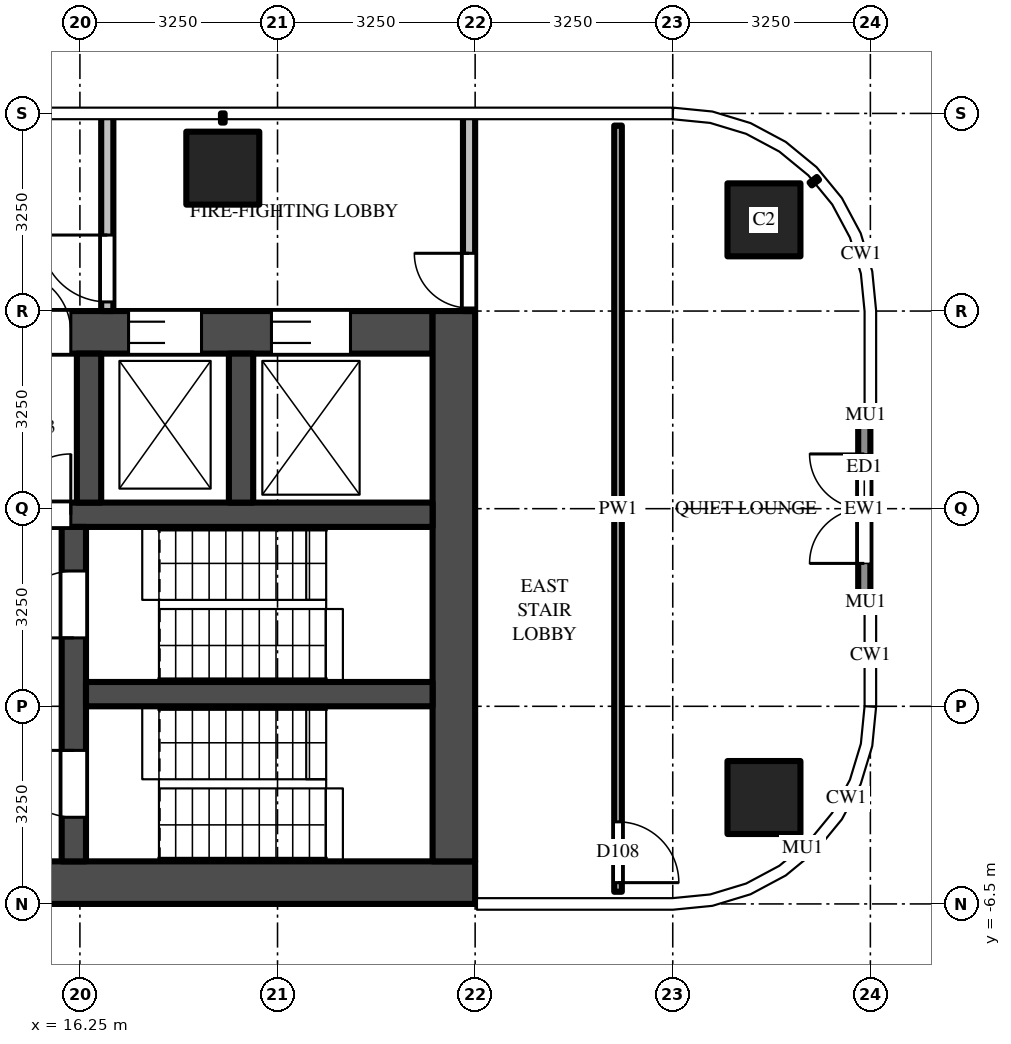
"""IFC4 building model, lengths in metres.
Left out: names, types, materials, properties, quantities, classifications, styles, units other than length and angle.
Written with IfcOpenShell. Run it as: python <this file> out.ifc"""

import sys

from ifc_helpers import new_model, si_unit, direction, frame, frame_2d, origin, origin_2d, place, context, subcontext, project, spatial, rectangle, extrude, source, transform, mapped, element, fill, save


model = new_model("IFC4")
c1 = context("Model", 3, precision=1e-05, world=origin(), true_north=direction((0.0, 1.0)))
c2 = subcontext(c1, "Body", "Model", "MODEL_VIEW")
j1 = project(units=[si_unit("LENGTHUNIT", "METRE"), si_unit("PLANEANGLEUNIT", "RADIAN")], contexts=[c1])
p1 = place(None, origin())
s1 = spatial("IfcSite", under=j1, at=p1, CompositionType="ELEMENT")
p2 = place(p1, origin())
s2 = spatial("IfcBuilding", under=s1, at=p2, CompositionType="ELEMENT")
p3 = place(p2, frame((0.0, 0.0, 181.5)))
s3 = spatial("IfcBuildingStorey", under=s2, at=p3, CompositionType="ELEMENT", Elevation=181.5)
m1 = source(origin(), c2, "Body", "SweptSolid", [
    extrude(rectangle(XDim=1.2, YDim=1.2, at=origin_2d()), origin(), (0.0, 0.0, 1.0), 3.9),
])
for number, where, z_axis, x_axis in (
    (1, (18.6, 5.6, 0.0), (0.0, 0.0, 1.0), (1.0, 0.0, 0.0)),
    (2, (27.5, 4.75, 0.0), (0.0, 0.0, 1.0), (1.0, 0.0, 0.0)),
    (3, (27.5, -4.75, 0.0), (0.0, 0.0, 1.0), (1.0, 0.0, 0.0)),
):
    element("IfcColumn", number, at=place(p3, frame(where, z_axis=z_axis, x_axis=x_axis)), inside=s3, PredefinedType="COLUMN", context=c2, shape_type="MappedRepresentation", body=[
        mapped(m1, transform((0.0, 0.0, 0.0))),
    ])
m2 = source(origin(), c2, "Body", "SweptSolid", [
    extrude(rectangle(XDim=16.55, YDim=0.7, at=frame_2d((8.275, 0.0))), origin(), (0.0, 0.0, 1.0), 3.7),
])
p4 = place(p3, frame((6.2, -6.15, 0.0), z_axis=(0.0, 0.0, 1.0), x_axis=(1.0, 0.0, 0.0)))
e4 = element("IfcWall", 4, at=p4, inside=s3, PredefinedType="SHEAR", context=c2, shape_type="MappedRepresentation", body=[
    mapped(m2, transform((0.0, 0.0, 0.0))),
])
m3 = source(origin(), c2, "Body", "SweptSolid", [
    extrude(rectangle(XDim=14.85, YDim=0.7, at=frame_2d((7.425, 0.0))), origin(), (0.0, 0.0, 1.0), 3.7),
])
p5 = place(p3, frame((7.2, 2.9, 0.0), z_axis=(0.0, 0.0, 1.0), x_axis=(1.0, 0.0, 0.0)))
e5 = element("IfcWall", 5, at=p5, inside=s3, PredefinedType="SHEAR", context=c2, shape_type="MappedRepresentation", body=[
    mapped(m3, transform((0.0, 0.0, 0.0))),
])
m4 = source(origin(), c2, "Body", "SweptSolid", [
    extrude(rectangle(XDim=1.1, YDim=2.1, at=frame_2d((0.55, 1.05))), frame((0.0, 0.36, 0.0), z_axis=(0.0, -1.0, 0.0), x_axis=(1.0, 0.0, 0.0)), (0.0, 0.0, 1.0), 0.72),
])
p6 = place(p5, frame((0.55, 0.0, 0.0)))
e6 = element("IfcOpeningElement", 6, at=p6, cuts=e5, PredefinedType="OPENING", context=c2, shape_type="MappedRepresentation", body=[
    mapped(m4, transform((0.0, 0.0, 0.0))),
])
p7 = place(p5, frame((3.15, 0.0, 0.0)))
e7 = element("IfcOpeningElement", 7, at=p7, cuts=e5, PredefinedType="OPENING", context=c2, shape_type="MappedRepresentation", body=[
    mapped(m4, transform((0.0, 0.0, 0.0))),
])
m5 = source(origin(), c2, "Body", "SweptSolid", [
    extrude(rectangle(XDim=1.2, YDim=2.1, at=frame_2d((0.6, 1.05))), frame((0.0, 0.36, 0.0), z_axis=(0.0, -1.0, 0.0), x_axis=(1.0, 0.0, 0.0)), (0.0, 0.0, 1.0), 0.72),
])
p8 = place(p5, frame((5.7, 0.0, 0.0)))
e8 = element("IfcOpeningElement", 8, at=p8, cuts=e5, PredefinedType="OPENING", context=c2, shape_type="MappedRepresentation", body=[
    mapped(m5, transform((0.0, 0.0, 0.0))),
])
m6 = source(origin(), c2, "Body", "SweptSolid", [
    extrude(rectangle(XDim=1.3, YDim=2.1, at=frame_2d((0.65, 1.05))), frame((0.0, 0.36, 0.0), z_axis=(0.0, -1.0, 0.0), x_axis=(1.0, 0.0, 0.0)), (0.0, 0.0, 1.0), 0.72),
])
p9 = place(p5, frame((12.2, 0.0, 0.0)))
e9 = element("IfcOpeningElement", 9, at=p9, cuts=e5, PredefinedType="OPENING", context=c2, shape_type="MappedRepresentation", body=[
    mapped(m6, transform((0.0, 0.0, 0.0))),
])
p10 = place(p5, frame((9.85, 0.0, 0.0)))
e10 = element("IfcOpeningElement", 10, at=p10, cuts=e5, PredefinedType="OPENING", context=c2, shape_type="MappedRepresentation", body=[
    mapped(m5, transform((0.0, 0.0, 0.0))),
])
m7 = source(origin(), c2, "Body", "SweptSolid", [
    extrude(rectangle(XDim=1.0, YDim=2.1, at=frame_2d((0.5, 1.05))), frame((0.0, 0.36, 0.0), z_axis=(0.0, -1.0, 0.0), x_axis=(1.0, 0.0, 0.0)), (0.0, 0.0, 1.0), 0.72),
])
p11 = place(p5, frame((7.9, 0.0, 0.0)))
e11 = element("IfcOpeningElement", 11, at=p11, cuts=e5, PredefinedType="OPENING", context=c2, shape_type="MappedRepresentation", body=[
    mapped(m7, transform((0.0, 0.0, 0.0))),
])
m8 = source(origin(), c2, "Body", "SweptSolid", [
    extrude(rectangle(XDim=9.05, YDim=0.7, at=frame_2d((4.525, 0.0))), origin(), (0.0, 0.0, 1.0), 3.7),
])
p12 = place(p3, frame((22.4, -5.8, 0.0), z_axis=(0.0, 0.0, 1.0), x_axis=(0.0, 1.0, 0.0)))
e12 = element("IfcWall", 12, at=p12, inside=s3, PredefinedType="SHEAR", context=c2, shape_type="MappedRepresentation", body=[
    mapped(m8, transform((0.0, 0.0, 0.0))),
])
m9 = source(origin(), c2, "Body", "SweptSolid", [
    extrude(rectangle(XDim=14.85, YDim=0.4, at=frame_2d((7.425, 0.0))), origin(), (0.0, 0.0, 1.0), 3.7),
])
p13 = place(p3, frame((7.2, -0.1, 0.0), z_axis=(0.0, 0.0, 1.0), x_axis=(1.0, 0.0, 0.0)))
e13 = element("IfcWall", 13, at=p13, inside=s3, PredefinedType="SHEAR", context=c2, shape_type="MappedRepresentation", body=[
    mapped(m9, transform((0.0, 0.0, 0.0))),
])
m10 = source(origin(), c2, "Body", "SweptSolid", [
    extrude(rectangle(XDim=1.0, YDim=2.1, at=frame_2d((0.5, 1.05))), frame((0.0, 0.21, 0.0), z_axis=(0.0, -1.0, 0.0), x_axis=(1.0, 0.0, 0.0)), (0.0, 0.0, 1.0), 0.42),
])
p14 = place(p13, frame((7.9, 0.0, 0.0)))
e14 = element("IfcOpeningElement", 14, at=p14, cuts=e13, PredefinedType="OPENING", context=c2, shape_type="MappedRepresentation", body=[
    mapped(m10, transform((0.0, 0.0, 0.0))),
])
m11 = source(origin(), c2, "Body", "SweptSolid", [
    extrude(rectangle(XDim=5.5, YDim=0.4, at=frame_2d((2.75, 0.0))), origin(), (0.0, 0.0, 1.0), 3.7),
])
p15 = place(p3, frame((16.15, -5.8, 0.0), z_axis=(0.0, 0.0, 1.0), x_axis=(0.0, 1.0, 0.0)))
e15 = element("IfcWall", 15, at=p15, inside=s3, PredefinedType="SHEAR", context=c2, shape_type="MappedRepresentation", body=[
    mapped(m11, transform((0.0, 0.0, 0.0))),
])
m12 = source(origin(), c2, "Body", "SweptSolid", [
    extrude(rectangle(XDim=1.1, YDim=2.1, at=frame_2d((0.55, 1.05))), frame((0.0, 0.21, 0.0), z_axis=(0.0, -1.0, 0.0), x_axis=(1.0, 0.0, 0.0)), (0.0, 0.0, 1.0), 0.42),
])
p16 = place(p15, frame((0.725, 0.0, 0.0)))
e16 = element("IfcOpeningElement", 16, at=p16, cuts=e15, PredefinedType="OPENING", context=c2, shape_type="MappedRepresentation", body=[
    mapped(m12, transform((0.0, 0.0, 0.0))),
])
p17 = place(p15, frame((3.675, 0.0, 0.0)))
e17 = element("IfcOpeningElement", 17, at=p17, cuts=e15, PredefinedType="OPENING", context=c2, shape_type="MappedRepresentation", body=[
    mapped(m12, transform((0.0, 0.0, 0.0))),
])
m13 = source(origin(), c2, "Body", "SweptSolid", [
    extrude(rectangle(XDim=5.7, YDim=0.4, at=frame_2d((2.85, 0.0))), origin(), (0.0, 0.0, 1.0), 3.7),
])
p18 = place(p3, frame((16.35, -3.05, 0.0), z_axis=(0.0, 0.0, 1.0), x_axis=(1.0, 0.0, 0.0)))
e18 = element("IfcWall", 18, at=p18, inside=s3, PredefinedType="SHEAR", context=c2, shape_type="MappedRepresentation", body=[
    mapped(m13, transform((0.0, 0.0, 0.0))),
])
m14 = source(origin(), c2, "Body", "SweptSolid", [
    extrude(rectangle(XDim=2.45, YDim=0.4, at=frame_2d((1.225, 0.0))), origin(), (0.0, 0.0, 1.0), 3.7),
])
for number, where, z_axis, x_axis in (
    (19, (16.4, 0.1, 0.0), (0.0, 0.0, 1.0), (0.0, 1.0, 0.0)),
    (20, (18.9, 0.1, 0.0), (0.0, 0.0, 1.0), (0.0, 1.0, 0.0)),
):
    element("IfcWall", number, at=place(p3, frame(where, z_axis=z_axis, x_axis=x_axis)), inside=s3, PredefinedType="SHEAR", context=c2, shape_type="MappedRepresentation", body=[
        mapped(m14, transform((0.0, 0.0, 0.0))),
    ])
m15 = source(origin(), c2, "Body", "SweptSolid", [
    extrude(rectangle(XDim=3.25, YDim=0.2, at=frame_2d((1.625, 0.0))), origin(), (0.0, 0.0, 1.0), 3.7),
])
p19 = place(p3, frame((16.7, 3.25, 0.0), z_axis=(0.0, 0.0, 1.0), x_axis=(0.0, 1.0, 0.0)))
e21 = element("IfcWall", 21, at=p19, inside=s3, PredefinedType="PARTITIONING", context=c2, shape_type="MappedRepresentation", body=[
    mapped(m15, transform((0.0, 0.0, 0.0))),
])
m16 = source(origin(), c2, "Body", "SweptSolid", [
    extrude(rectangle(XDim=1.1, YDim=2.1, at=frame_2d((0.55, 1.05))), frame((0.0, 0.11, 0.0), z_axis=(0.0, -1.0, 0.0), x_axis=(1.0, 0.0, 0.0)), (0.0, 0.0, 1.0), 0.22),
])
p20 = place(p19, frame((0.15, 0.0, 0.0)))
e22 = element("IfcOpeningElement", 22, at=p20, cuts=e21, PredefinedType="OPENING", context=c2, shape_type="MappedRepresentation", body=[
    mapped(m16, transform((0.0, 0.0, 0.0))),
])
p21 = place(p3, frame((22.65, 3.25, 0.0), z_axis=(0.0, 0.0, 1.0), x_axis=(0.0, 1.0, 0.0)))
e23 = element("IfcWall", 23, at=p21, inside=s3, PredefinedType="PARTITIONING", context=c2, shape_type="MappedRepresentation", body=[
    mapped(m15, transform((0.0, 0.0, 0.0))),
])
m17 = source(origin(), c2, "Body", "SweptSolid", [
    extrude(rectangle(XDim=0.9, YDim=2.1, at=frame_2d((0.45, 1.05))), frame((0.0, 0.11, 0.0), z_axis=(0.0, -1.0, 0.0), x_axis=(1.0, 0.0, 0.0)), (0.0, 0.0, 1.0), 0.22),
])
p22 = place(p21, frame((0.05, 0.0, 0.0)))
e24 = element("IfcOpeningElement", 24, at=p22, cuts=e23, PredefinedType="OPENING", context=c2, shape_type="MappedRepresentation", body=[
    mapped(m17, transform((0.0, 0.0, 0.0))),
])
m18 = source(origin(), c2, "Body", "SweptSolid", [
    extrude(rectangle(XDim=3.0, YDim=0.2, at=frame_2d((1.5, 0.0))), origin(), (0.0, 0.0, 1.0), 3.7),
])
p23 = place(p3, frame((29.15, -1.5, 0.0), z_axis=(0.0, 0.0, 1.0), x_axis=(0.0, 1.0, 0.0)))
e25 = element("IfcWall", 25, at=p23, inside=s3, PredefinedType="SOLIDWALL", context=c2, shape_type="MappedRepresentation", body=[
    mapped(m18, transform((0.0, 0.0, 0.0))),
])
m19 = source(origin(), c2, "Body", "SweptSolid", [
    extrude(rectangle(XDim=1.8, YDim=2.4, at=frame_2d((0.9, 1.2))), frame((0.0, 0.11, 0.0), z_axis=(0.0, -1.0, 0.0), x_axis=(1.0, 0.0, 0.0)), (0.0, 0.0, 1.0), 0.22),
])
p24 = place(p23, frame((0.6, 0.0, 0.0)))
e26 = element("IfcOpeningElement", 26, at=p24, cuts=e25, PredefinedType="OPENING", context=c2, shape_type="MappedRepresentation", body=[
    mapped(m19, transform((0.0, 0.0, 0.0))),
])
m20 = source(origin(), c2, "Body", "SweptSolid", [
    extrude(rectangle(XDim=12.6, YDim=0.125, at=frame_2d((6.3, 0.0))), origin(), (0.0, 0.0, 1.0), 2.78),
])
p25 = place(p3, frame((25.1, 6.3, 0.0), z_axis=(0.0, 0.0, 1.0), x_axis=(0.0, -1.0, 0.0)))
e27 = element("IfcWall", 27, at=p25, inside=s3, PredefinedType="PARTITIONING", context=c2, shape_type="MappedRepresentation", body=[
    mapped(m20, transform((0.0, 0.0, 0.0))),
])
m21 = source(origin(), c2, "Body", "SweptSolid", [
    extrude(rectangle(XDim=1.0, YDim=2.1, at=frame_2d((0.5, 1.05))), frame((0.0, 0.073, 0.0), z_axis=(0.0, -1.0, 0.0), x_axis=(1.0, 0.0, 0.0)), (0.0, 0.0, 1.0), 0.145),
])
p26 = place(p25, frame((11.45, 0.0, 0.0)))
e28 = element("IfcOpeningElement", 28, at=p26, cuts=e27, PredefinedType="OPENING", context=c2, shape_type="MappedRepresentation", body=[
    mapped(m21, transform((0.0, 0.0, 0.0))),
])
m22 = source(origin(), c2, "Body", "SweptSolid", [
    extrude(rectangle(XDim=1.3, YDim=2.1, at=frame_2d((0.65, 1.05))), frame((0.0, -0.275, 0.0), z_axis=(0.0, -1.0, 0.0), x_axis=(1.0, 0.0, 0.0)), (0.0, 0.0, 1.0), 0.05),
])
p27 = place(p9, origin())
e29 = element("IfcDoor", 29, at=p27, inside=s3, OperationType="DOUBLE_DOOR_SLIDING", PredefinedType="DOOR", context=c2, shape_type="MappedRepresentation", body=[
    mapped(m22, transform((0.0, 0.0, 0.0))),
])
fill(e9, e29)
m23 = source(origin(), c2, "Body", "SweptSolid", [
    extrude(rectangle(XDim=1.2, YDim=2.1, at=frame_2d((0.6, 1.05))), frame((0.0, -0.275, 0.0), z_axis=(0.0, -1.0, 0.0), x_axis=(1.0, 0.0, 0.0)), (0.0, 0.0, 1.0), 0.05),
])
p28 = place(p10, origin())
e30 = element("IfcDoor", 30, at=p28, inside=s3, OperationType="DOUBLE_DOOR_SLIDING", PredefinedType="DOOR", context=c2, shape_type="MappedRepresentation", body=[
    mapped(m23, transform((0.0, 0.0, 0.0))),
])
fill(e10, e30)
m24 = source(origin(), c2, "Body", "SweptSolid", [
    extrude(rectangle(XDim=1.1, YDim=2.1, at=frame_2d((0.55, 1.05))), frame((0.0, 0.025, 0.0), z_axis=(0.0, -1.0, 0.0), x_axis=(1.0, 0.0, 0.0)), (0.0, 0.0, 1.0), 0.05),
])
p29 = place(p16, origin())
e31 = element("IfcDoor", 31, at=p29, inside=s3, OperationType="SINGLE_SWING_RIGHT", PredefinedType="DOOR", context=c2, shape_type="MappedRepresentation", body=[
    mapped(m24, transform((0.0, 0.0, 0.0))),
])
fill(e16, e31)
p30 = place(p17, origin())
e32 = element("IfcDoor", 32, at=p30, inside=s3, OperationType="SINGLE_SWING_LEFT", PredefinedType="DOOR", context=c2, shape_type="MappedRepresentation", body=[
    mapped(m24, transform((0.0, 0.0, 0.0))),
])
fill(e17, e32)
m25 = source(origin(), c2, "Body", "SweptSolid", [
    extrude(rectangle(XDim=1.0, YDim=2.1, at=frame_2d((0.5, 1.05))), frame((0.0, 0.025, 0.0), z_axis=(0.0, -1.0, 0.0), x_axis=(1.0, 0.0, 0.0)), (0.0, 0.0, 1.0), 0.05),
])
p31 = place(p14, origin())
e33 = element("IfcDoor", 33, at=p31, inside=s3, OperationType="SINGLE_SWING_RIGHT", PredefinedType="DOOR", context=c2, shape_type="MappedRepresentation", body=[
    mapped(m25, transform((0.0, 0.0, 0.0))),
])
fill(e14, e33)
m26 = source(origin(), c2, "Body", "SweptSolid", [
    extrude(rectangle(XDim=1.0, YDim=2.1, at=frame_2d((0.5, 1.05))), frame((0.0, -0.275, 0.0), z_axis=(0.0, -1.0, 0.0), x_axis=(1.0, 0.0, 0.0)), (0.0, 0.0, 1.0), 0.05),
])
p32 = place(p11, origin())
e34 = element("IfcDoor", 34, at=p32, inside=s3, OperationType="SINGLE_SWING_LEFT", PredefinedType="DOOR", context=c2, shape_type="MappedRepresentation", body=[
    mapped(m26, transform((0.0, 0.0, 0.0))),
])
fill(e11, e34)
p33 = place(p20, origin())
e35 = element("IfcDoor", 35, at=p33, inside=s3, OperationType="SINGLE_SWING_RIGHT", PredefinedType="DOOR", context=c2, shape_type="MappedRepresentation", body=[
    mapped(m24, transform((0.0, 0.0, 0.0))),
])
fill(e22, e35)
m27 = source(origin(), c2, "Body", "SweptSolid", [
    extrude(rectangle(XDim=0.9, YDim=2.1, at=frame_2d((0.45, 1.05))), frame((0.0, 0.025, 0.0), z_axis=(0.0, -1.0, 0.0), x_axis=(1.0, 0.0, 0.0)), (0.0, 0.0, 1.0), 0.05),
])
p34 = place(p22, origin())
e36 = element("IfcDoor", 36, at=p34, inside=s3, OperationType="SINGLE_SWING_RIGHT", PredefinedType="DOOR", context=c2, shape_type="MappedRepresentation", body=[
    mapped(m27, transform((0.0, 0.0, 0.0))),
])
fill(e24, e36)
m28 = source(origin(), c2, "Body", "SweptSolid", [
    extrude(rectangle(XDim=1.8, YDim=2.4, at=frame_2d((0.9, 1.2))), frame((0.0, 0.025, 0.0), z_axis=(0.0, -1.0, 0.0), x_axis=(1.0, 0.0, 0.0)), (0.0, 0.0, 1.0), 0.05),
])
p35 = place(p24, origin())
e37 = element("IfcDoor", 37, at=p35, inside=s3, OperationType="DOUBLE_DOOR_SINGLE_SWING", PredefinedType="DOOR", context=c2, shape_type="MappedRepresentation", body=[
    mapped(m28, transform((0.0, 0.0, 0.0))),
])
fill(e26, e37)
p36 = place(p26, origin())
e38 = element("IfcDoor", 38, at=p36, inside=s3, OperationType="SINGLE_SWING_RIGHT", PredefinedType="DOOR", context=c2, shape_type="MappedRepresentation", body=[
    mapped(m25, transform((0.0, 0.0, 0.0))),
])
fill(e28, e38)
save(model, sys.argv[1])
